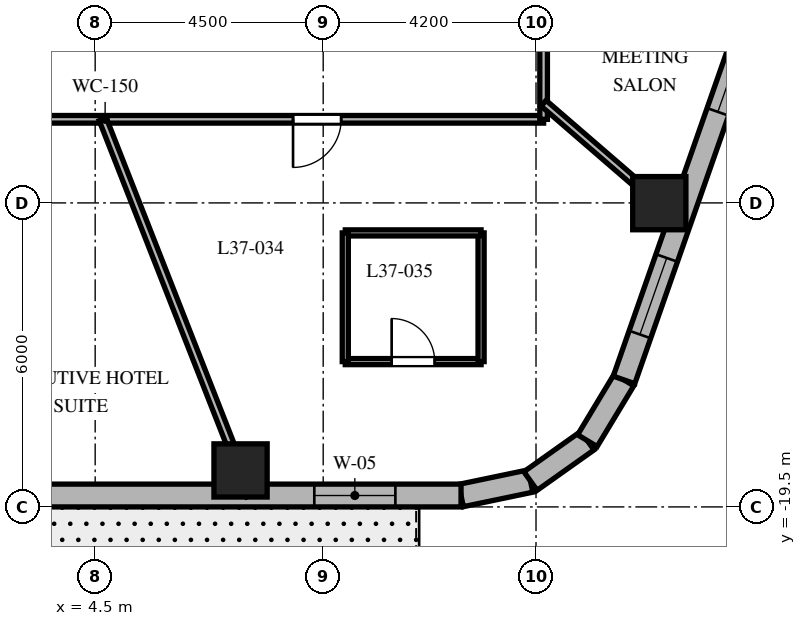
"""IFC4 building model, lengths in metres.
Left out: names, types, materials, properties, quantities, classifications, styles, units other than length and angle.
Written with IfcOpenShell. Run it as: python <this file> out.ifc"""

import sys

from ifc_helpers import new_model, si_unit, direction, frame, frame_2d, origin, origin_2d, place, context, subcontext, project, spatial, rectangle, extrude, element, fill, save


model = new_model("IFC4")
c1 = context("Model", 3, precision=1e-05, world=origin(), true_north=direction((0.0, 1.0)))
c2 = subcontext(c1, "Body", "Model", "MODEL_VIEW")
j1 = project(units=[si_unit("LENGTHUNIT", "METRE"), si_unit("PLANEANGLEUNIT", "RADIAN")], contexts=[c1])
p1 = place(None, origin())
s1 = spatial("IfcSite", under=j1, at=p1, CompositionType="ELEMENT")
p2 = place(p1, origin())
s2 = spatial("IfcBuilding", under=s1, at=p2, CompositionType="ELEMENT")
p3 = place(p2, frame((0.0, 0.0, 151.7)))
s3 = spatial("IfcBuildingStorey", under=s2, at=p3, CompositionType="ELEMENT", Elevation=151.7)
for number, where, z_axis, x_axis in (
    (1, (7.369, -18.78, 0.0), (0.0, 0.0, 1.0), (1.0, 0.0, 0.0)),
    (2, (15.633, -13.505, 0.0), (0.0, 0.0, 1.0), (1.0, 0.0, 0.0)),
):
    element("IfcColumn", number, at=place(p3, frame(where, z_axis=z_axis, x_axis=x_axis)), inside=s3, PredefinedType="COLUMN", context=c2, shape_type="SweptSolid", body=[
        extrude(rectangle(XDim=1.05, YDim=1.05, at=origin_2d()), origin(), (0.0, 0.0, 1.0), 3.7),
    ])
p4 = place(p3, frame((11.72, -19.275, 0.0), z_axis=(0.0, 0.0, 1.0), x_axis=(0.97893106758, 0.204191001093, 0.0)))
e3 = element("IfcWall", 3, at=p4, inside=s3, PredefinedType="SOLIDWALL", context=c2, shape_type="SweptSolid", body=[
    extrude(rectangle(XDim=1.4, YDim=0.45, at=frame_2d((0.7, 0.0))), origin(), (0.0, 0.0, 1.0), 3.4),
])
p5 = place(p3, frame((13.091, -18.989, 0.0), z_axis=(0.0, 0.0, 1.0), x_axis=(0.815574637848, 0.578651890258, 0.0)))
e4 = element("IfcWall", 4, at=p5, inside=s3, PredefinedType="SOLIDWALL", context=c2, shape_type="SweptSolid", body=[
    extrude(rectangle(XDim=1.377, YDim=0.45, at=frame_2d((0.688, 0.0))), origin(), (0.0, 0.0, 1.0), 3.4),
])
p6 = place(p3, frame((14.214, -18.192, 0.0), z_axis=(0.0, 0.0, 1.0), x_axis=(0.516340945502, 0.856383108193, 0.0)))
e5 = element("IfcWall", 5, at=p6, inside=s3, PredefinedType="SOLIDWALL", context=c2, shape_type="SweptSolid", body=[
    extrude(rectangle(XDim=1.4, YDim=0.45, at=frame_2d((0.7, 0.0))), origin(), (0.0, 0.0, 1.0), 3.4),
])
p7 = place(p3, frame((-10.108, -19.275, 0.0), z_axis=(0.0, 0.0, 1.0), x_axis=(1.0, 0.0, 0.0)))
e6 = element("IfcWall", 6, at=p7, inside=s3, PredefinedType="SOLIDWALL", context=c2, shape_type="SweptSolid", body=[
    extrude(rectangle(XDim=21.829, YDim=0.45, at=frame_2d((10.915, 0.0))), origin(), (0.0, 0.0, 1.0), 3.4),
])
p8 = place(p7, frame((5.503, 0.0, 0.0)))
e7 = element("IfcOpeningElement", 7, at=p8, cuts=e6, PredefinedType="OPENING", context=c2, shape_type="SweptSolid", body=[
    extrude(rectangle(XDim=1.0, YDim=2.15, at=frame_2d((0.5, 1.075))), frame((0.0, 0.235, 0.0), z_axis=(0.0, -1.0, 0.0), x_axis=(1.0, 0.0, 0.0)), (0.0, 0.0, 1.0), 0.47),
])
p9 = place(p7, frame((1.297, 0.0, 0.8)))
e8 = element("IfcOpeningElement", 8, at=p9, cuts=e6, PredefinedType="OPENING", context=c2, shape_type="SweptSolid", body=[
    extrude(rectangle(XDim=1.6, YDim=1.75, at=frame_2d((0.8, 0.875))), frame((0.0, 0.235, 0.0), z_axis=(0.0, -1.0, 0.0), x_axis=(1.0, 0.0, 0.0)), (0.0, 0.0, 1.0), 0.47),
])
p10 = place(p7, frame((10.115, 0.0, 0.8)))
e9 = element("IfcOpeningElement", 9, at=p10, cuts=e6, PredefinedType="OPENING", context=c2, shape_type="SweptSolid", body=[
    extrude(rectangle(XDim=1.6, YDim=1.75, at=frame_2d((0.8, 0.875))), frame((0.0, 0.235, 0.0), z_axis=(0.0, -1.0, 0.0), x_axis=(1.0, 0.0, 0.0)), (0.0, 0.0, 1.0), 0.47),
])
p11 = place(p7, frame((18.933, 0.0, 0.8)))
e10 = element("IfcOpeningElement", 10, at=p11, cuts=e6, PredefinedType="OPENING", context=c2, shape_type="SweptSolid", body=[
    extrude(rectangle(XDim=1.6, YDim=1.75, at=frame_2d((0.8, 0.875))), frame((0.0, 0.235, 0.0), z_axis=(0.0, -1.0, 0.0), x_axis=(1.0, 0.0, 0.0)), (0.0, 0.0, 1.0), 0.47),
])
p12 = place(p3, frame((14.937, -16.993, 0.0), z_axis=(0.0, 0.0, 1.0), x_axis=(0.330431575061, 0.943829949834, 0.0)))
e11 = element("IfcWall", 11, at=p12, inside=s3, PredefinedType="SOLIDWALL", context=c2, shape_type="SweptSolid", body=[
    extrude(rectangle(XDim=17.689, YDim=0.45, at=frame_2d((8.844, 0.0))), origin(), (0.0, 0.0, 1.0), 3.4),
])
p13 = place(p12, frame((0.95, 0.0, 0.8)))
e12 = element("IfcOpeningElement", 12, at=p13, cuts=e11, PredefinedType="OPENING", context=c2, shape_type="SweptSolid", body=[
    extrude(rectangle(XDim=1.6, YDim=1.75, at=frame_2d((0.8, 0.875))), frame((0.0, 0.235, 0.0), z_axis=(0.0, -1.0, 0.0), x_axis=(1.0, 0.0, 0.0)), (0.0, 0.0, 1.0), 0.47),
])
p14 = place(p12, frame((5.605, 0.0, 0.8)))
e13 = element("IfcOpeningElement", 13, at=p14, cuts=e11, PredefinedType="OPENING", context=c2, shape_type="SweptSolid", body=[
    extrude(rectangle(XDim=1.6, YDim=1.75, at=frame_2d((0.8, 0.875))), frame((0.0, 0.235, 0.0), z_axis=(0.0, -1.0, 0.0), x_axis=(1.0, 0.0, 0.0)), (0.0, 0.0, 1.0), 0.47),
])
p15 = place(p12, frame((10.531, 0.0, 0.8)))
e14 = element("IfcOpeningElement", 14, at=p15, cuts=e11, PredefinedType="OPENING", context=c2, shape_type="SweptSolid", body=[
    extrude(rectangle(XDim=1.6, YDim=1.75, at=frame_2d((0.8, 0.875))), frame((0.0, 0.235, 0.0), z_axis=(0.0, -1.0, 0.0), x_axis=(1.0, 0.0, 0.0)), (0.0, 0.0, 1.0), 0.47),
])
p16 = place(p12, frame((15.084, 0.0, 0.8)))
e15 = element("IfcOpeningElement", 15, at=p16, cuts=e11, PredefinedType="OPENING", context=c2, shape_type="SweptSolid", body=[
    extrude(rectangle(XDim=1.6, YDim=1.75, at=frame_2d((0.8, 0.875))), frame((0.0, 0.235, 0.0), z_axis=(0.0, -1.0, 0.0), x_axis=(1.0, 0.0, 0.0)), (0.0, 0.0, 1.0), 0.47),
])
p17 = place(p3, frame((13.35, -11.85, 0.0), z_axis=(0.0, 0.0, 1.0), x_axis=(-1.0, 0.0, 0.0)))
e16 = element("IfcWall", 16, at=p17, inside=s3, PredefinedType="PARTITIONING", context=c2, shape_type="SweptSolid", body=[
    extrude(rectangle(XDim=26.7, YDim=0.15, at=frame_2d((13.35, 0.0))), origin(), (0.0, 0.0, 1.0), 2.84),
])
p18 = place(p17, frame((20.682, 0.0, 0.0)))
e17 = element("IfcOpeningElement", 17, at=p18, cuts=e16, PredefinedType="OPENING", context=c2, shape_type="SweptSolid", body=[
    extrude(rectangle(XDim=0.95, YDim=2.03, at=frame_2d((0.475, 1.015))), frame((0.0, 0.085, 0.0), z_axis=(0.0, -1.0, 0.0), x_axis=(1.0, 0.0, 0.0)), (0.0, 0.0, 1.0), 0.17),
])
p19 = place(p17, frame((12.362, 0.0, 0.0)))
e18 = element("IfcOpeningElement", 18, at=p19, cuts=e16, PredefinedType="OPENING", context=c2, shape_type="SweptSolid", body=[
    extrude(rectangle(XDim=0.95, YDim=2.03, at=frame_2d((0.475, 1.015))), frame((0.0, 0.085, 0.0), z_axis=(0.0, -1.0, 0.0), x_axis=(1.0, 0.0, 0.0)), (0.0, 0.0, 1.0), 0.17),
])
p20 = place(p17, frame((3.995, 0.0, 0.0)))
e19 = element("IfcOpeningElement", 19, at=p20, cuts=e16, PredefinedType="OPENING", context=c2, shape_type="SweptSolid", body=[
    extrude(rectangle(XDim=0.95, YDim=2.03, at=frame_2d((0.475, 1.015))), frame((0.0, 0.085, 0.0), z_axis=(0.0, -1.0, 0.0), x_axis=(1.0, 0.0, 0.0)), (0.0, 0.0, 1.0), 0.17),
])
p21 = place(p3, frame((13.35, 11.85, 0.0), z_axis=(0.0, 0.0, 1.0), x_axis=(0.0, -1.0, 0.0)))
e20 = element("IfcWall", 20, at=p21, inside=s3, PredefinedType="PARTITIONING", context=c2, shape_type="SweptSolid", body=[
    extrude(rectangle(XDim=23.7, YDim=0.15, at=frame_2d((11.85, 0.0))), origin(), (0.0, 0.0, 1.0), 2.84),
])
p22 = place(p21, frame((3.765, 0.0, 0.0)))
e21 = element("IfcOpeningElement", 21, at=p22, cuts=e20, PredefinedType="OPENING", context=c2, shape_type="SweptSolid", body=[
    extrude(rectangle(XDim=0.9, YDim=2.03, at=frame_2d((0.45, 1.015))), frame((0.0, 0.085, 0.0), z_axis=(0.0, -1.0, 0.0), x_axis=(1.0, 0.0, 0.0)), (0.0, 0.0, 1.0), 0.17),
])
p23 = place(p21, frame((20.395, 0.0, 0.0)))
e22 = element("IfcOpeningElement", 22, at=p23, cuts=e20, PredefinedType="OPENING", context=c2, shape_type="SweptSolid", body=[
    extrude(rectangle(XDim=0.9, YDim=2.03, at=frame_2d((0.45, 1.015))), frame((0.0, 0.085, 0.0), z_axis=(0.0, -1.0, 0.0), x_axis=(1.0, 0.0, 0.0)), (0.0, 0.0, 1.0), 0.17),
])
p24 = place(p21, frame((15.787, 0.0, 0.0)))
e23 = element("IfcOpeningElement", 23, at=p24, cuts=e20, PredefinedType="OPENING", context=c2, shape_type="SweptSolid", body=[
    extrude(rectangle(XDim=0.95, YDim=2.03, at=frame_2d((0.475, 1.015))), frame((0.0, 0.085, 0.0), z_axis=(0.0, -1.0, 0.0), x_axis=(1.0, 0.0, 0.0)), (0.0, 0.0, 1.0), 0.17),
])
p25 = place(p21, frame((10.751, 0.0, 0.0)))
e24 = element("IfcOpeningElement", 24, at=p25, cuts=e20, PredefinedType="OPENING", context=c2, shape_type="SweptSolid", body=[
    extrude(rectangle(XDim=0.95, YDim=2.03, at=frame_2d((0.475, 1.015))), frame((0.0, 0.085, 0.0), z_axis=(0.0, -1.0, 0.0), x_axis=(1.0, 0.0, 0.0)), (0.0, 0.0, 1.0), 0.17),
])
p26 = place(p3, frame((4.65, -11.85, 0.0), z_axis=(0.0, 0.0, 1.0), x_axis=(0.365265947993, -0.930903210456, 0.0)))
e25 = element("IfcWall", 25, at=p26, inside=s3, PredefinedType="PARTITIONING", context=c2, shape_type="SweptSolid", body=[
    extrude(rectangle(XDim=7.976, YDim=0.15, at=frame_2d((3.988, 0.0))), origin(), (0.0, 0.0, 1.0), 2.64),
])
p27 = place(p3, frame((13.35, -11.533, 0.0), z_axis=(0.0, 0.0, 1.0), x_axis=(0.756711647314, -0.65374879183, 0.0)))
e26 = element("IfcWall", 26, at=p27, inside=s3, PredefinedType="PARTITIONING", context=c2, shape_type="SweptSolid", body=[
    extrude(rectangle(XDim=3.55, YDim=0.15, at=frame_2d((1.775, 0.0))), origin(), (0.0, 0.0, 1.0), 2.64),
])
p28 = place(p3, frame((9.436, -16.632, 0.0), z_axis=(0.0, 0.0, 1.0), x_axis=(1.0, 0.0, 0.0)))
e27 = element("IfcWall", 27, at=p28, inside=s3, PredefinedType="PARTITIONING", context=c2, shape_type="SweptSolid", body=[
    extrude(rectangle(XDim=2.68, YDim=0.12, at=frame_2d((1.34, 0.0))), origin(), (0.0, 0.0, 1.0), 2.64),
])
p29 = place(p28, frame((0.915, 0.0, 0.0)))
e28 = element("IfcOpeningElement", 28, at=p29, cuts=e27, PredefinedType="OPENING", context=c2, shape_type="SweptSolid", body=[
    extrude(rectangle(XDim=0.85, YDim=2.03, at=frame_2d((0.425, 1.015))), frame((0.0, 0.07, 0.0), z_axis=(0.0, -1.0, 0.0), x_axis=(1.0, 0.0, 0.0)), (0.0, 0.0, 1.0), 0.14),
])
p30 = place(p3, frame((12.116, -16.632, 0.0), z_axis=(0.0, 0.0, 1.0), x_axis=(0.0, 1.0, 0.0)))
e29 = element("IfcWall", 29, at=p30, inside=s3, PredefinedType="PARTITIONING", context=c2, shape_type="SweptSolid", body=[
    extrude(rectangle(XDim=2.54, YDim=0.12, at=frame_2d((1.27, 0.0))), origin(), (0.0, 0.0, 1.0), 2.64),
])
p31 = place(p3, frame((12.116, -14.092, 0.0), z_axis=(0.0, 0.0, 1.0), x_axis=(-1.0, 0.0, 0.0)))
e30 = element("IfcWall", 30, at=p31, inside=s3, PredefinedType="PARTITIONING", context=c2, shape_type="SweptSolid", body=[
    extrude(rectangle(XDim=2.68, YDim=0.12, at=frame_2d((1.34, 0.0))), origin(), (0.0, 0.0, 1.0), 2.927),
])
p32 = place(p3, frame((9.436, -14.092, 0.0), z_axis=(0.0, 0.0, 1.0), x_axis=(0.0, -1.0, 0.0)))
e31 = element("IfcWall", 31, at=p32, inside=s3, PredefinedType="PARTITIONING", context=c2, shape_type="SweptSolid", body=[
    extrude(rectangle(XDim=2.54, YDim=0.12, at=frame_2d((1.27, 0.0))), origin(), (0.0, 0.0, 1.0), 2.927),
])
p33 = place(p11, origin())
e32 = element("IfcWindow", 32, at=p33, inside=s3, PartitioningType="SINGLE_PANEL", PredefinedType="WINDOW", context=c2, shape_type="SweptSolid", body=[
    extrude(rectangle(XDim=1.6, YDim=1.75, at=frame_2d((0.8, 0.875))), frame((0.0, 0.03, 0.0), z_axis=(0.0, -1.0, 0.0), x_axis=(1.0, 0.0, 0.0)), (0.0, 0.0, 1.0), 0.06),
])
fill(e10, e32)
p34 = place(p13, origin())
e33 = element("IfcWindow", 33, at=p34, inside=s3, PartitioningType="SINGLE_PANEL", PredefinedType="WINDOW", context=c2, shape_type="SweptSolid", body=[
    extrude(rectangle(XDim=1.6, YDim=1.75, at=frame_2d((0.8, 0.875))), frame((0.0, 0.03, 0.0), z_axis=(0.0, -1.0, 0.0), x_axis=(1.0, 0.0, 0.0)), (0.0, 0.0, 1.0), 0.06),
])
fill(e12, e33)
p35 = place(p14, origin())
e34 = element("IfcWindow", 34, at=p35, inside=s3, PartitioningType="SINGLE_PANEL", PredefinedType="WINDOW", context=c2, shape_type="SweptSolid", body=[
    extrude(rectangle(XDim=1.6, YDim=1.75, at=frame_2d((0.8, 0.875))), frame((0.0, 0.03, 0.0), z_axis=(0.0, -1.0, 0.0), x_axis=(1.0, 0.0, 0.0)), (0.0, 0.0, 1.0), 0.06),
])
fill(e13, e34)
p36 = place(p20, origin())
e35 = element("IfcDoor", 35, at=p36, inside=s3, OperationType="SINGLE_SWING_RIGHT", PredefinedType="DOOR", context=c2, shape_type="SweptSolid", body=[
    extrude(rectangle(XDim=0.95, YDim=2.03, at=frame_2d((0.475, 1.015))), frame((0.0, 0.025, 0.0), z_axis=(0.0, -1.0, 0.0), x_axis=(1.0, 0.0, 0.0)), (0.0, 0.0, 1.0), 0.05),
])
fill(e19, e35)
p37 = place(p29, origin())
e36 = element("IfcDoor", 36, at=p37, inside=s3, OperationType="SINGLE_SWING_LEFT", PredefinedType="DOOR", context=c2, shape_type="SweptSolid", body=[
    extrude(rectangle(XDim=0.85, YDim=2.03, at=frame_2d((0.425, 1.015))), frame((0.0, 0.025, 0.0), z_axis=(0.0, -1.0, 0.0), x_axis=(1.0, 0.0, 0.0)), (0.0, 0.0, 1.0), 0.05),
])
fill(e28, e36)
save(model, sys.argv[1])
